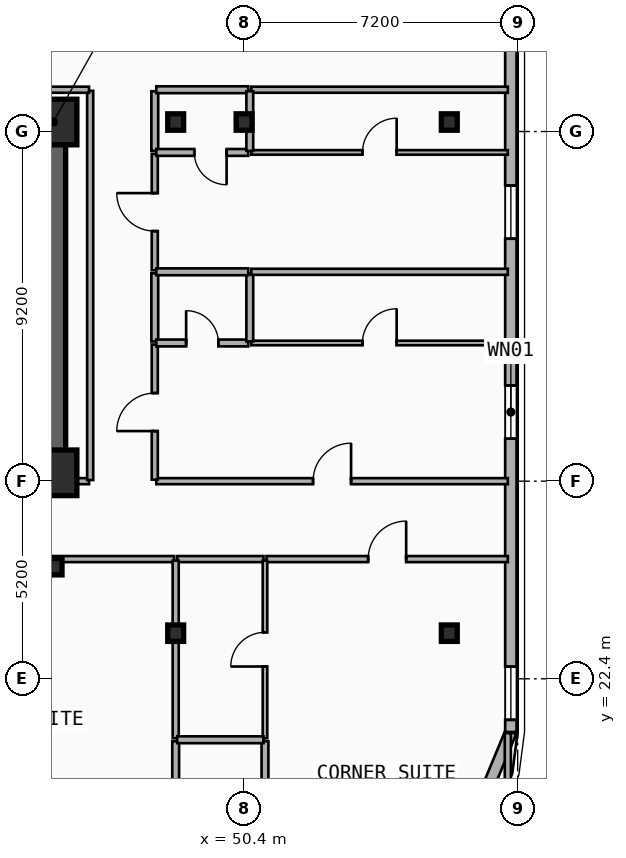
"""IFC4 building model, lengths in metres.
Left out: names, types, materials, properties, quantities, classifications, styles, units other than length and angle.
Written with IfcOpenShell. Run it as: python <this file> out.ifc"""

import sys

from ifc_helpers import new_model, si_unit, direction, frame, frame_2d, origin, origin_2d, place, context, subcontext, project, spatial, rectangle, i_section, extrude, element, fill, save


model = new_model("IFC4")
c1 = context("Model", 3, precision=1e-05, world=origin(), true_north=direction((0.0, 1.0)))
c2 = subcontext(c1, "Body", "Model", "MODEL_VIEW")
j1 = project(units=[si_unit("LENGTHUNIT", "METRE"), si_unit("PLANEANGLEUNIT", "RADIAN")], contexts=[c1])
p1 = place(None, origin())
s1 = spatial("IfcSite", under=j1, at=p1, CompositionType="ELEMENT")
p2 = place(p1, origin())
s2 = spatial("IfcBuilding", under=s1, at=p2, CompositionType="ELEMENT")
p3 = place(p2, frame((0.0, 0.0, 118.8)))
s3 = spatial("IfcBuildingStorey", under=s2, at=p3, CompositionType="ELEMENT", Elevation=118.8)
p4 = place(p3, frame((12.15, 37.05, 0.0), z_axis=(0.0, 0.0, 1.0), x_axis=(1.0, 0.0, 0.0)))
e1 = element("IfcWall", 1, at=p4, inside=s3, PredefinedType="SHEAR", context=c2, shape_type="SweptSolid", body=[
    extrude(rectangle(XDim=33.23, YDim=0.65, at=frame_2d((16.615, 0.0))), origin(), (0.0, 0.0, 1.0), 3.5),
])
p5 = place(p3, frame((45.38, 27.82, 0.0), z_axis=(0.0, 0.0, 1.0), x_axis=(-1.0, 0.0, 0.0)))
e2 = element("IfcWall", 2, at=p5, inside=s3, PredefinedType="SHEAR", context=c2, shape_type="SweptSolid", body=[
    extrude(rectangle(XDim=12.23, YDim=0.65, at=frame_2d((6.115, 0.0))), origin(), (0.0, 0.0, 1.0), 3.5),
])
p6 = place(p5, frame((9.93, 0.0, 0.0)))
e3 = element("IfcOpeningElement", 3, at=p6, cuts=e2, PredefinedType="OPENING", context=c2, shape_type="SweptSolid", body=[
    extrude(rectangle(XDim=1.1, YDim=2.15, at=frame_2d((0.55, 1.075))), frame((0.0, 0.335, 0.0), z_axis=(0.0, -1.0, 0.0), x_axis=(1.0, 0.0, 0.0)), (0.0, 0.0, 1.0), 0.67),
])
p7 = place(p5, frame((6.23, 0.0, 0.0)))
e4 = element("IfcOpeningElement", 4, at=p7, cuts=e2, PredefinedType="OPENING", context=c2, shape_type="SweptSolid", body=[
    extrude(rectangle(XDim=1.1, YDim=2.15, at=frame_2d((0.55, 1.075))), frame((0.0, 0.335, 0.0), z_axis=(0.0, -1.0, 0.0), x_axis=(1.0, 0.0, 0.0)), (0.0, 0.0, 1.0), 0.67),
])
p8 = place(p3, frame((45.38, 28.145, 0.0), z_axis=(0.0, 0.0, 1.0), x_axis=(0.0, 1.0, 0.0)))
e5 = element("IfcWall", 5, at=p8, inside=s3, PredefinedType="SHEAR", context=c2, shape_type="SweptSolid", body=[
    extrude(rectangle(XDim=8.58, YDim=0.65, at=frame_2d((4.29, 0.0))), origin(), (0.0, 0.0, 1.0), 3.5),
])
for number, where, z_axis, x_axis in (
    (6, (45.4, 27.82, 0.0), (0.0, 0.0, 1.0), (1.0, 0.0, 0.0)),
    (7, (45.4, 37.05, 0.0), (0.0, 0.0, 1.0), (1.0, 0.0, 0.0)),
):
    element("IfcColumn", number, at=place(p3, frame(where, z_axis=z_axis, x_axis=x_axis)), inside=s3, PredefinedType="COLUMN", context=c2, shape_type="SweptSolid", body=[
        extrude(rectangle(XDim=1.2, YDim=1.2, at=origin_2d()), origin(), (0.0, 0.0, 1.0), 3.5),
    ])
for number, where, z_axis, x_axis in (
    (8, (45.4, 25.35, 0.0), (0.0, 0.0, 1.0), (1.0, 0.0, 0.0)),
    (9, (48.6, 23.6, 0.0), (0.0, 0.0, 1.0), (1.0, 0.0, 0.0)),
    (10, (48.6, 37.05, 0.0), (0.0, 0.0, 1.0), (1.0, 0.0, 0.0)),
    (11, (50.4, 37.05, 0.0), (0.0, 0.0, 1.0), (1.0, 0.0, 0.0)),
    (12, (55.8, 23.6, 0.0), (0.0, 0.0, 1.0), (1.0, 0.0, 0.0)),
    (13, (55.8, 37.05, 0.0), (0.0, 0.0, 1.0), (1.0, 0.0, 0.0)),
):
    element("IfcColumn", number, at=place(p3, frame(where, z_axis=z_axis, x_axis=x_axis)), inside=s3, PredefinedType="COLUMN", context=c2, shape_type="SweptSolid", body=[
        extrude(i_section(OverallWidth=0.418, OverallDepth=0.432, WebThickness=0.035, FlangeThickness=0.056, FilletRadius=0.015, at=origin_2d()), origin(), (0.0, 0.0, 1.0), 3.5),
    ])
p9 = place(p3, frame((57.42, 21.0, 0.0), z_axis=(0.0, 0.0, 1.0), x_axis=(-0.382636798336, -0.92389884758, 0.0)))
e14 = element("IfcWall", 14, at=p9, inside=s3, PredefinedType="SOLIDWALL", context=c2, shape_type="SweptSolid", body=[
    extrude(rectangle(XDim=3.077, YDim=0.3, at=frame_2d((1.538, 0.0))), origin(), (0.0, 0.0, 1.0), 3.24),
])
p10 = place(p3, frame((57.42, 39.0, 0.0), z_axis=(0.0, 0.0, 1.0), x_axis=(0.0, -1.0, 0.0)))
e15 = element("IfcWall", 15, at=p10, inside=s3, PredefinedType="SOLIDWALL", context=c2, shape_type="SweptSolid", body=[
    extrude(rectangle(XDim=18.0, YDim=0.3, at=frame_2d((9.0, 0.0))), origin(), (0.0, 0.0, 1.0), 3.24),
])
p11 = place(p10, frame((8.882, 0.0, 0.48)))
e16 = element("IfcOpeningElement", 16, at=p11, cuts=e15, PredefinedType="OPENING", context=c2, shape_type="SweptSolid", body=[
    extrude(rectangle(XDim=1.4, YDim=1.8, at=frame_2d((0.7, 0.9))), frame((0.0, 0.16, 0.0), z_axis=(0.0, -1.0, 0.0), x_axis=(1.0, 0.0, 0.0)), (0.0, 0.0, 1.0), 0.32),
])
p12 = place(p10, frame((3.621, 0.0, 0.48)))
e17 = element("IfcOpeningElement", 17, at=p12, cuts=e15, PredefinedType="OPENING", context=c2, shape_type="SweptSolid", body=[
    extrude(rectangle(XDim=1.4, YDim=1.8, at=frame_2d((0.7, 0.9))), frame((0.0, 0.16, 0.0), z_axis=(0.0, -1.0, 0.0), x_axis=(1.0, 0.0, 0.0)), (0.0, 0.0, 1.0), 0.32),
])
p13 = place(p10, frame((16.28, 0.0, 0.65)))
e18 = element("IfcOpeningElement", 18, at=p13, cuts=e15, PredefinedType="OPENING", context=c2, shape_type="SweptSolid", body=[
    extrude(rectangle(XDim=1.4, YDim=1.8, at=frame_2d((0.7, 0.9))), frame((0.0, 0.16, 0.0), z_axis=(0.0, -1.0, 0.0), x_axis=(1.0, 0.0, 0.0)), (0.0, 0.0, 1.0), 0.32),
])
p14 = place(p3, frame((48.09, 27.6, 0.0), z_axis=(0.0, 0.0, 1.0), x_axis=(1.0, 0.0, 0.0)))
e19 = element("IfcWall", 19, at=p14, inside=s3, PredefinedType="PARTITIONING", context=c2, shape_type="SweptSolid", body=[
    extrude(rectangle(XDim=9.25, YDim=0.16, at=frame_2d((4.625, 0.0))), origin(), (0.0, 0.0, 1.0), 2.57),
])
p15 = place(p14, frame((4.125, 0.0, 0.0)))
e20 = element("IfcOpeningElement", 20, at=p15, cuts=e19, PredefinedType="OPENING", context=c2, shape_type="SweptSolid", body=[
    extrude(rectangle(XDim=1.0, YDim=2.15, at=frame_2d((0.5, 1.075))), frame((0.0, 0.09, 0.0), z_axis=(0.0, -1.0, 0.0), x_axis=(1.0, 0.0, 0.0)), (0.0, 0.0, 1.0), 0.18),
])
p16 = place(p3, frame((40.74, 25.55, 0.0), z_axis=(0.0, 0.0, 1.0), x_axis=(1.0, 0.0, 0.0)))
e21 = element("IfcWall", 21, at=p16, inside=s3, PredefinedType="PARTITIONING", context=c2, shape_type="SweptSolid", body=[
    extrude(rectangle(XDim=7.82, YDim=0.16, at=frame_2d((3.91, 0.0))), origin(), (0.0, 0.0, 1.0), 2.406),
])
p17 = place(p16, frame((0.413, 0.0, 0.0)))
e22 = element("IfcOpeningElement", 22, at=p17, cuts=e21, PredefinedType="OPENING", context=c2, shape_type="SweptSolid", body=[
    extrude(rectangle(XDim=1.0, YDim=2.15, at=frame_2d((0.5, 1.075))), frame((0.0, 0.09, 0.0), z_axis=(0.0, -1.0, 0.0), x_axis=(1.0, 0.0, 0.0)), (0.0, 0.0, 1.0), 0.18),
])
p18 = place(p3, frame((50.99, 25.55, 0.0), z_axis=(0.0, 0.0, 1.0), x_axis=(1.0, 0.0, 0.0)))
e23 = element("IfcWall", 23, at=p18, inside=s3, PredefinedType="PARTITIONING", context=c2, shape_type="SweptSolid", body=[
    extrude(rectangle(XDim=6.35, YDim=0.16, at=frame_2d((3.175, 0.0))), origin(), (0.0, 0.0, 1.0), 2.57),
])
p19 = place(p18, frame((2.675, 0.0, 0.0)))
e24 = element("IfcOpeningElement", 24, at=p19, cuts=e23, PredefinedType="OPENING", context=c2, shape_type="SweptSolid", body=[
    extrude(rectangle(XDim=1.0, YDim=2.15, at=frame_2d((0.5, 1.075))), frame((0.0, 0.09, 0.0), z_axis=(0.0, -1.0, 0.0), x_axis=(1.0, 0.0, 0.0)), (0.0, 0.0, 1.0), 0.18),
])
p20 = place(p3, frame((48.64, 25.55, 0.0), z_axis=(0.0, 0.0, 1.0), x_axis=(1.0, 0.0, 0.0)))
e25 = element("IfcWall", 25, at=p20, inside=s3, PredefinedType="PARTITIONING", context=c2, shape_type="SweptSolid", body=[
    extrude(rectangle(XDim=2.27, YDim=0.16, at=frame_2d((1.135, 0.0))), origin(), (0.0, 0.0, 1.0), 2.57),
])
p21 = place(p3, frame((48.05, 27.64, 0.0), z_axis=(0.0, 0.0, 1.0), x_axis=(0.0, 1.0, 0.0)))
e26 = element("IfcWall", 26, at=p21, inside=s3, PredefinedType="PARTITIONING", context=c2, shape_type="SweptSolid", body=[
    extrude(rectangle(XDim=3.556, YDim=0.16, at=frame_2d((1.778, 0.0))), origin(), (0.0, 0.0, 1.0), 3.24),
])
p22 = place(p21, frame((1.278, 0.0, 0.0)))
e27 = element("IfcOpeningElement", 27, at=p22, cuts=e26, PredefinedType="OPENING", context=c2, shape_type="SweptSolid", body=[
    extrude(rectangle(XDim=1.0, YDim=2.15, at=frame_2d((0.5, 1.075))), frame((0.0, 0.09, 0.0), z_axis=(0.0, -1.0, 0.0), x_axis=(1.0, 0.0, 0.0)), (0.0, 0.0, 1.0), 0.18),
])
p23 = place(p3, frame((48.05, 31.276, 0.0), z_axis=(0.0, 0.0, 1.0), x_axis=(0.0, 1.0, 0.0)))
e28 = element("IfcWall", 28, at=p23, inside=s3, PredefinedType="PLUMBINGWALL", context=c2, shape_type="SweptSolid", body=[
    extrude(rectangle(XDim=1.793, YDim=0.18, at=frame_2d((0.896, 0.0))), origin(), (0.0, 0.0, 1.0), 3.24),
])
p24 = place(p3, frame((48.05, 33.149, 0.0), z_axis=(0.0, 0.0, 1.0), x_axis=(0.0, 1.0, 0.0)))
e29 = element("IfcWall", 29, at=p24, inside=s3, PredefinedType="PARTITIONING", context=c2, shape_type="SweptSolid", body=[
    extrude(rectangle(XDim=3.061, YDim=0.16, at=frame_2d((1.531, 0.0))), origin(), (0.0, 0.0, 1.0), 3.24),
])
p25 = place(p24, frame((1.031, 0.0, 0.0)))
e30 = element("IfcOpeningElement", 30, at=p25, cuts=e29, PredefinedType="OPENING", context=c2, shape_type="SweptSolid", body=[
    extrude(rectangle(XDim=1.0, YDim=2.15, at=frame_2d((0.5, 1.075))), frame((0.0, 0.09, 0.0), z_axis=(0.0, -1.0, 0.0), x_axis=(1.0, 0.0, 0.0)), (0.0, 0.0, 1.0), 0.18),
])
p26 = place(p3, frame((48.05, 36.29, 0.0), z_axis=(0.0, 0.0, 1.0), x_axis=(0.0, 1.0, 0.0)))
e31 = element("IfcWall", 31, at=p26, inside=s3, PredefinedType="PLUMBINGWALL", context=c2, shape_type="SweptSolid", body=[
    extrude(rectangle(XDim=1.57, YDim=0.18, at=frame_2d((0.785, 0.0))), origin(), (0.0, 0.0, 1.0), 2.72),
])
p27 = place(p3, frame((48.09, 37.9, 0.0), z_axis=(0.0, 0.0, 1.0), x_axis=(1.0, 0.0, 0.0)))
e32 = element("IfcWall", 32, at=p27, inside=s3, PredefinedType="PLUMBINGWALL", context=c2, shape_type="SweptSolid", body=[
    extrude(rectangle(XDim=2.42, YDim=0.18, at=frame_2d((1.21, 0.0))), origin(), (0.0, 0.0, 1.0), 3.24),
])
p28 = place(p3, frame((50.59, 37.9, 0.0), z_axis=(0.0, 0.0, 1.0), x_axis=(1.0, 0.0, 0.0)))
e33 = element("IfcWall", 33, at=p28, inside=s3, PredefinedType="PARTITIONING", context=c2, shape_type="SweptSolid", body=[
    extrude(rectangle(XDim=6.75, YDim=0.16, at=frame_2d((3.375, 0.0))), origin(), (0.0, 0.0, 1.0), 3.24),
])
p29 = place(p3, frame((48.09, 31.236, 0.0), z_axis=(0.0, 0.0, 1.0), x_axis=(1.0, 0.0, 0.0)))
e34 = element("IfcWall", 34, at=p29, inside=s3, PredefinedType="PLUMBINGWALL", context=c2, shape_type="SweptSolid", body=[
    extrude(rectangle(XDim=2.42, YDim=0.18, at=frame_2d((1.21, 0.0))), origin(), (0.0, 0.0, 1.0), 2.57),
])
p30 = place(p29, frame((0.785, 0.0, 0.0)))
e35 = element("IfcOpeningElement", 35, at=p30, cuts=e34, PredefinedType="OPENING", context=c2, shape_type="SweptSolid", body=[
    extrude(rectangle(XDim=0.85, YDim=2.1, at=frame_2d((0.425, 1.05))), frame((0.0, 0.1, 0.0), z_axis=(0.0, -1.0, 0.0), x_axis=(1.0, 0.0, 0.0)), (0.0, 0.0, 1.0), 0.2),
])
p31 = place(p3, frame((50.59, 31.236, 0.0), z_axis=(0.0, 0.0, 1.0), x_axis=(1.0, 0.0, 0.0)))
e36 = element("IfcWall", 36, at=p31, inside=s3, PredefinedType="PARTITIONING", context=c2, shape_type="SweptSolid", body=[
    extrude(rectangle(XDim=6.75, YDim=0.12, at=frame_2d((3.375, 0.0))), origin(), (0.0, 0.0, 1.0), 2.57),
])
p32 = place(p31, frame((2.925, 0.0, 0.0)))
e37 = element("IfcOpeningElement", 37, at=p32, cuts=e36, PredefinedType="OPENING", context=c2, shape_type="SweptSolid", body=[
    extrude(rectangle(XDim=0.9, YDim=2.1, at=frame_2d((0.45, 1.05))), frame((0.0, 0.07, 0.0), z_axis=(0.0, -1.0, 0.0), x_axis=(1.0, 0.0, 0.0)), (0.0, 0.0, 1.0), 0.14),
])
p33 = place(p3, frame((50.55, 31.276, 0.0), z_axis=(0.0, 0.0, 1.0), x_axis=(0.0, 1.0, 0.0)))
e38 = element("IfcWall", 38, at=p33, inside=s3, PredefinedType="PLUMBINGWALL", context=c2, shape_type="SweptSolid", body=[
    extrude(rectangle(XDim=1.793, YDim=0.18, at=frame_2d((0.896, 0.0))), origin(), (0.0, 0.0, 1.0), 2.57),
])
p34 = place(p3, frame((48.09, 33.109, 0.0), z_axis=(0.0, 0.0, 1.0), x_axis=(1.0, 0.0, 0.0)))
e39 = element("IfcWall", 39, at=p34, inside=s3, PredefinedType="PLUMBINGWALL", context=c2, shape_type="SweptSolid", body=[
    extrude(rectangle(XDim=2.42, YDim=0.18, at=frame_2d((1.21, 0.0))), origin(), (0.0, 0.0, 1.0), 2.57),
])
p35 = place(p3, frame((50.59, 33.109, 0.0), z_axis=(0.0, 0.0, 1.0), x_axis=(1.0, 0.0, 0.0)))
e40 = element("IfcWall", 40, at=p35, inside=s3, PredefinedType="PARTITIONING", context=c2, shape_type="SweptSolid", body=[
    extrude(rectangle(XDim=6.75, YDim=0.16, at=frame_2d((3.375, 0.0))), origin(), (0.0, 0.0, 1.0), 2.57),
])
p36 = place(p3, frame((50.51, 36.25, 0.0), z_axis=(0.0, 0.0, 1.0), x_axis=(-1.0, 0.0, 0.0)))
e41 = element("IfcWall", 41, at=p36, inside=s3, PredefinedType="PLUMBINGWALL", context=c2, shape_type="SweptSolid", body=[
    extrude(rectangle(XDim=2.42, YDim=0.18, at=frame_2d((1.21, 0.0))), origin(), (0.0, 0.0, 1.0), 2.57),
])
p37 = place(p36, frame((0.57, 0.0, 0.0)))
e42 = element("IfcOpeningElement", 42, at=p37, cuts=e41, PredefinedType="OPENING", context=c2, shape_type="SweptSolid", body=[
    extrude(rectangle(XDim=0.85, YDim=2.1, at=frame_2d((0.425, 1.05))), frame((0.0, 0.1, 0.0), z_axis=(0.0, -1.0, 0.0), x_axis=(1.0, 0.0, 0.0)), (0.0, 0.0, 1.0), 0.2),
])
p38 = place(p3, frame((50.59, 36.25, 0.0), z_axis=(0.0, 0.0, 1.0), x_axis=(1.0, 0.0, 0.0)))
e43 = element("IfcWall", 43, at=p38, inside=s3, PredefinedType="PARTITIONING", context=c2, shape_type="SweptSolid", body=[
    extrude(rectangle(XDim=6.75, YDim=0.12, at=frame_2d((3.375, 0.0))), origin(), (0.0, 0.0, 1.0), 2.57),
])
p39 = place(p38, frame((2.925, 0.0, 0.0)))
e44 = element("IfcOpeningElement", 44, at=p39, cuts=e43, PredefinedType="OPENING", context=c2, shape_type="SweptSolid", body=[
    extrude(rectangle(XDim=0.9, YDim=2.1, at=frame_2d((0.45, 1.05))), frame((0.0, 0.07, 0.0), z_axis=(0.0, -1.0, 0.0), x_axis=(1.0, 0.0, 0.0)), (0.0, 0.0, 1.0), 0.14),
])
p40 = place(p3, frame((50.55, 36.29, 0.0), z_axis=(0.0, 0.0, 1.0), x_axis=(0.0, 1.0, 0.0)))
e45 = element("IfcWall", 45, at=p40, inside=s3, PredefinedType="PLUMBINGWALL", context=c2, shape_type="SweptSolid", body=[
    extrude(rectangle(XDim=1.57, YDim=0.18, at=frame_2d((0.785, 0.0))), origin(), (0.0, 0.0, 1.0), 2.57),
])
p41 = place(p3, frame((48.6, 17.06, 0.0), z_axis=(0.0, 0.0, 1.0), x_axis=(0.0, 1.0, 0.0)))
e46 = element("IfcWall", 46, at=p41, inside=s3, PredefinedType="PLUMBINGWALL", context=c2, shape_type="SweptSolid", body=[
    extrude(rectangle(XDim=3.696, YDim=0.18, at=frame_2d((1.848, 0.0))), origin(), (0.0, 0.0, 1.0), 2.72),
])
p42 = place(p3, frame((48.6, 20.836, 0.0), z_axis=(0.0, 0.0, 1.0), x_axis=(0.0, 1.0, 0.0)))
e47 = element("IfcWall", 47, at=p42, inside=s3, PredefinedType="PARTITIONING", context=c2, shape_type="SweptSolid", body=[
    extrude(rectangle(XDim=4.674, YDim=0.16, at=frame_2d((2.337, 0.0))), origin(), (0.0, 0.0, 1.0), 2.72),
])
p43 = place(p3, frame((50.95, 17.06, 0.0), z_axis=(0.0, 0.0, 1.0), x_axis=(0.0, 1.0, 0.0)))
e48 = element("IfcWall", 48, at=p43, inside=s3, PredefinedType="PLUMBINGWALL", context=c2, shape_type="SweptSolid", body=[
    extrude(rectangle(XDim=3.696, YDim=0.18, at=frame_2d((1.848, 0.0))), origin(), (0.0, 0.0, 1.0), 2.57),
])
p44 = place(p43, frame((1.423, 0.0, 0.0)))
e49 = element("IfcOpeningElement", 49, at=p44, cuts=e48, PredefinedType="OPENING", context=c2, shape_type="SweptSolid", body=[
    extrude(rectangle(XDim=0.85, YDim=2.1, at=frame_2d((0.425, 1.05))), frame((0.0, 0.1, 0.0), z_axis=(0.0, -1.0, 0.0), x_axis=(1.0, 0.0, 0.0)), (0.0, 0.0, 1.0), 0.2),
])
p45 = place(p3, frame((50.95, 20.836, 0.0), z_axis=(0.0, 0.0, 1.0), x_axis=(0.0, 1.0, 0.0)))
e50 = element("IfcWall", 50, at=p45, inside=s3, PredefinedType="PARTITIONING", context=c2, shape_type="SweptSolid", body=[
    extrude(rectangle(XDim=4.674, YDim=0.12, at=frame_2d((2.337, 0.0))), origin(), (0.0, 0.0, 1.0), 2.57),
])
p46 = place(p45, frame((1.887, 0.0, 0.0)))
e51 = element("IfcOpeningElement", 51, at=p46, cuts=e50, PredefinedType="OPENING", context=c2, shape_type="SweptSolid", body=[
    extrude(rectangle(XDim=0.9, YDim=2.1, at=frame_2d((0.45, 1.05))), frame((0.0, 0.07, 0.0), z_axis=(0.0, -1.0, 0.0), x_axis=(1.0, 0.0, 0.0)), (0.0, 0.0, 1.0), 0.14),
])
p47 = place(p3, frame((48.64, 20.796, 0.0), z_axis=(0.0, 0.0, 1.0), x_axis=(1.0, 0.0, 0.0)))
e52 = element("IfcWall", 52, at=p47, inside=s3, PredefinedType="PLUMBINGWALL", context=c2, shape_type="SweptSolid", body=[
    extrude(rectangle(XDim=2.27, YDim=0.18, at=frame_2d((1.135, 0.0))), origin(), (0.0, 0.0, 1.0), 2.57),
])
p48 = place(p3, frame((45.41, 27.6, 0.0), z_axis=(0.0, 0.0, 1.0), x_axis=(1.0, 0.0, 0.0)))
e53 = element("IfcWall", 53, at=p48, inside=s3, PredefinedType="PARTITIONING", context=c2, shape_type="SweptSolid", body=[
    extrude(rectangle(XDim=0.91, YDim=0.16, at=frame_2d((0.455, 0.0))), origin(), (0.0, 0.0, 1.0), 2.28),
])
p49 = place(p3, frame((46.35, 27.63, 0.0), z_axis=(0.0, 0.0, 1.0), x_axis=(0.0, 1.0, 0.0)))
e54 = element("IfcWall", 54, at=p49, inside=s3, PredefinedType="PARTITIONING", context=c2, shape_type="SweptSolid", body=[
    extrude(rectangle(XDim=10.24, YDim=0.16, at=frame_2d((5.12, 0.0))), origin(), (0.0, 0.0, 1.0), 2.72),
])
p50 = place(p3, frame((11.28, 37.9, 0.0), z_axis=(0.0, 0.0, 1.0), x_axis=(1.0, 0.0, 0.0)))
e55 = element("IfcWall", 55, at=p50, inside=s3, PredefinedType="PARTITIONING", context=c2, shape_type="SweptSolid", body=[
    extrude(rectangle(XDim=35.04, YDim=0.16, at=frame_2d((17.52, 0.0))), origin(), (0.0, 0.0, 1.0), 3.24),
])
p51 = place(p3, frame((57.34, 17.09, 0.0), z_axis=(0.0, 0.0, 1.0), x_axis=(0.0, 1.0, 0.0)))
e56 = element("IfcWall", 56, at=p51, inside=s3, PredefinedType="PARTITIONING", context=c2, shape_type="SweptSolid", body=[
    extrude(rectangle(XDim=3.88, YDim=0.16, at=frame_2d((1.94, 0.0))), origin(), (0.0, 0.0, 1.0), 3.24),
])
p52 = place(p11, origin())
e57 = element("IfcWindow", 57, at=p52, inside=s3, PartitioningType="SINGLE_PANEL", PredefinedType="WINDOW", context=c2, shape_type="SweptSolid", body=[
    extrude(rectangle(XDim=1.4, YDim=1.8, at=frame_2d((0.7, 0.9))), frame((0.0, 0.03, 0.0), z_axis=(0.0, -1.0, 0.0), x_axis=(1.0, 0.0, 0.0)), (0.0, 0.0, 1.0), 0.06),
])
fill(e16, e57)
p53 = place(p12, origin())
e58 = element("IfcWindow", 58, at=p53, inside=s3, PartitioningType="SINGLE_PANEL", PredefinedType="WINDOW", context=c2, shape_type="SweptSolid", body=[
    extrude(rectangle(XDim=1.4, YDim=1.8, at=frame_2d((0.7, 0.9))), frame((0.0, 0.03, 0.0), z_axis=(0.0, -1.0, 0.0), x_axis=(1.0, 0.0, 0.0)), (0.0, 0.0, 1.0), 0.06),
])
fill(e17, e58)
p54 = place(p13, origin())
e59 = element("IfcWindow", 59, at=p54, inside=s3, PartitioningType="SINGLE_PANEL", PredefinedType="WINDOW", context=c2, shape_type="SweptSolid", body=[
    extrude(rectangle(XDim=1.4, YDim=1.8, at=frame_2d((0.7, 0.9))), frame((0.0, 0.03, 0.0), z_axis=(0.0, -1.0, 0.0), x_axis=(1.0, 0.0, 0.0)), (0.0, 0.0, 1.0), 0.06),
])
fill(e18, e59)
p55 = place(p15, origin())
e60 = element("IfcDoor", 60, at=p55, inside=s3, OperationType="SINGLE_SWING_RIGHT", PredefinedType="DOOR", context=c2, shape_type="SweptSolid", body=[
    extrude(rectangle(XDim=1.0, YDim=2.15, at=frame_2d((0.5, 1.075))), frame((0.0, 0.025, 0.0), z_axis=(0.0, -1.0, 0.0), x_axis=(1.0, 0.0, 0.0)), (0.0, 0.0, 1.0), 0.05),
])
fill(e20, e60)
p56 = place(p19, origin())
e61 = element("IfcDoor", 61, at=p56, inside=s3, OperationType="SINGLE_SWING_RIGHT", PredefinedType="DOOR", context=c2, shape_type="SweptSolid", body=[
    extrude(rectangle(XDim=1.0, YDim=2.15, at=frame_2d((0.5, 1.075))), frame((0.0, 0.025, 0.0), z_axis=(0.0, -1.0, 0.0), x_axis=(1.0, 0.0, 0.0)), (0.0, 0.0, 1.0), 0.05),
])
fill(e24, e61)
p57 = place(p22, origin())
e62 = element("IfcDoor", 62, at=p57, inside=s3, OperationType="SINGLE_SWING_LEFT", PredefinedType="DOOR", context=c2, shape_type="SweptSolid", body=[
    extrude(rectangle(XDim=1.0, YDim=2.15, at=frame_2d((0.5, 1.075))), frame((0.0, 0.025, 0.0), z_axis=(0.0, -1.0, 0.0), x_axis=(1.0, 0.0, 0.0)), (0.0, 0.0, 1.0), 0.05),
])
fill(e27, e62)
p58 = place(p25, origin())
e63 = element("IfcDoor", 63, at=p58, inside=s3, OperationType="SINGLE_SWING_RIGHT", PredefinedType="DOOR", context=c2, shape_type="SweptSolid", body=[
    extrude(rectangle(XDim=1.0, YDim=2.15, at=frame_2d((0.5, 1.075))), frame((0.0, 0.025, 0.0), z_axis=(0.0, -1.0, 0.0), x_axis=(1.0, 0.0, 0.0)), (0.0, 0.0, 1.0), 0.05),
])
fill(e30, e63)
p59 = place(p30, origin())
e64 = element("IfcDoor", 64, at=p59, inside=s3, OperationType="SINGLE_SWING_LEFT", PredefinedType="DOOR", context=c2, shape_type="SweptSolid", body=[
    extrude(rectangle(XDim=0.85, YDim=2.1, at=frame_2d((0.425, 1.05))), frame((0.0, 0.025, 0.0), z_axis=(0.0, -1.0, 0.0), x_axis=(1.0, 0.0, 0.0)), (0.0, 0.0, 1.0), 0.05),
])
fill(e35, e64)
p60 = place(p32, origin())
e65 = element("IfcDoor", 65, at=p60, inside=s3, OperationType="SINGLE_SWING_RIGHT", PredefinedType="DOOR", context=c2, shape_type="SweptSolid", body=[
    extrude(rectangle(XDim=0.9, YDim=2.1, at=frame_2d((0.45, 1.05))), frame((0.0, 0.025, 0.0), z_axis=(0.0, -1.0, 0.0), x_axis=(1.0, 0.0, 0.0)), (0.0, 0.0, 1.0), 0.05),
])
fill(e37, e65)
p61 = place(p37, origin())
e66 = element("IfcDoor", 66, at=p61, inside=s3, OperationType="SINGLE_SWING_LEFT", PredefinedType="DOOR", context=c2, shape_type="SweptSolid", body=[
    extrude(rectangle(XDim=0.85, YDim=2.1, at=frame_2d((0.425, 1.05))), frame((0.0, 0.025, 0.0), z_axis=(0.0, -1.0, 0.0), x_axis=(1.0, 0.0, 0.0)), (0.0, 0.0, 1.0), 0.05),
])
fill(e42, e66)
p62 = place(p39, origin())
e67 = element("IfcDoor", 67, at=p62, inside=s3, OperationType="SINGLE_SWING_RIGHT", PredefinedType="DOOR", context=c2, shape_type="SweptSolid", body=[
    extrude(rectangle(XDim=0.9, YDim=2.1, at=frame_2d((0.45, 1.05))), frame((0.0, 0.025, 0.0), z_axis=(0.0, -1.0, 0.0), x_axis=(1.0, 0.0, 0.0)), (0.0, 0.0, 1.0), 0.05),
])
fill(e44, e67)
p63 = place(p46, origin())
e68 = element("IfcDoor", 68, at=p63, inside=s3, OperationType="SINGLE_SWING_LEFT", PredefinedType="DOOR", context=c2, shape_type="SweptSolid", body=[
    extrude(rectangle(XDim=0.9, YDim=2.1, at=frame_2d((0.45, 1.05))), frame((0.0, 0.025, 0.0), z_axis=(0.0, -1.0, 0.0), x_axis=(1.0, 0.0, 0.0)), (0.0, 0.0, 1.0), 0.05),
])
fill(e51, e68)
save(model, sys.argv[1])
